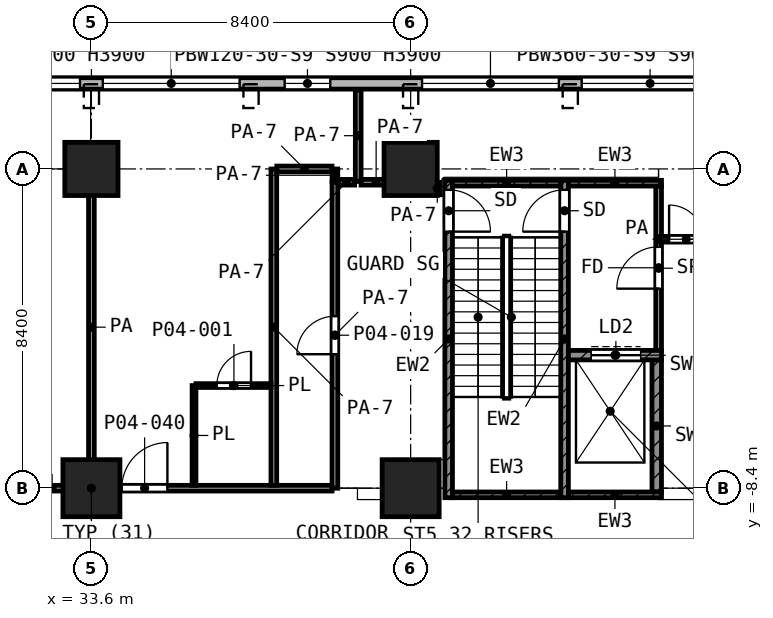
"""IFC4 building model, lengths in metres.
Left out: names, types, materials, properties, quantities, classifications, styles, units other than length and angle.
Written with IfcOpenShell. Run it as: python <this file> out.ifc"""

import sys

from ifc_helpers import new_model, si_unit, direction, frame, frame_2d, origin, origin_2d, place, context, subcontext, project, spatial, rectangle, extrude, element, fill, save


model = new_model("IFC4")
c1 = context("Model", 3, precision=1e-05, world=origin(), true_north=direction((0.0, 1.0)))
c2 = subcontext(c1, "Body", "Model", "MODEL_VIEW")
j1 = project(units=[si_unit("LENGTHUNIT", "METRE"), si_unit("PLANEANGLEUNIT", "RADIAN")], contexts=[c1])
p1 = place(None, origin())
s1 = spatial("IfcSite", under=j1, at=p1, CompositionType="ELEMENT")
p2 = place(p1, origin())
s2 = spatial("IfcBuilding", under=s1, at=p2, CompositionType="ELEMENT")
p3 = place(p2, frame((0.0, 0.0, 18.2)))
s3 = spatial("IfcBuildingStorey", under=s2, at=p3, CompositionType="ELEMENT", Elevation=18.2)
for number, where, z_axis, x_axis in (
    (1, (33.6, 0.0, 0.0), (0.0, 0.0, 1.0), (1.0, 0.0, 0.0)),
    (2, (42.0, 0.0, 0.0), (0.0, 0.0, 1.0), (1.0, 0.0, 0.0)),
):
    element("IfcColumn", number, at=place(p3, frame(where, z_axis=z_axis, x_axis=x_axis)), inside=s3, PredefinedType="COLUMN", context=c2, shape_type="SweptSolid", body=[
        extrude(rectangle(XDim=1.4, YDim=1.4, at=origin_2d()), origin(), (0.0, 0.0, 1.0), 5.6),
    ])
for number, where, z_axis, x_axis in (
    (3, (33.6, -8.4, 0.0), (0.0, 0.0, 1.0), (1.0, 0.0, 0.0)),
    (4, (42.0, -8.4, 0.0), (0.0, 0.0, 1.0), (1.0, 0.0, 0.0)),
):
    element("IfcColumn", number, at=place(p3, frame(where, z_axis=z_axis, x_axis=x_axis)), inside=s3, PredefinedType="COLUMN", context=c2, shape_type="SweptSolid", body=[
        extrude(rectangle(XDim=1.5, YDim=1.5, at=origin_2d()), origin(), (0.0, 0.0, 1.0), 5.6),
    ])
p4 = place(p3, frame((59.85, 2.25, 0.0), z_axis=(0.0, 0.0, 1.0), x_axis=(-1.0, 0.0, 0.0)))
e5 = element("IfcWall", 5, at=p4, inside=s3, PredefinedType="SOLIDWALL", context=c2, shape_type="SweptSolid", body=[
    extrude(rectangle(XDim=56.188, YDim=0.3, at=frame_2d((28.094, 0.0))), origin(), (0.0, 0.0, 1.0), 5.05),
])
p5 = place(p4, frame((2.465, 0.0, 0.9)))
e6 = element("IfcOpeningElement", 6, at=p5, cuts=e5, PredefinedType="OPENING", context=c2, shape_type="SweptSolid", body=[
    extrude(rectangle(XDim=2.4, YDim=3.0, at=frame_2d((1.2, 1.5))), frame((0.0, 0.16, 0.0), z_axis=(0.0, -1.0, 0.0), x_axis=(1.0, 0.0, 0.0)), (0.0, 0.0, 1.0), 0.32),
])
p6 = place(p4, frame((5.55, 0.0, 0.9)))
e7 = element("IfcOpeningElement", 7, at=p6, cuts=e5, PredefinedType="OPENING", context=c2, shape_type="SweptSolid", body=[
    extrude(rectangle(XDim=3.6, YDim=3.0, at=frame_2d((1.8, 1.5))), frame((0.0, 0.16, 0.0), z_axis=(0.0, -1.0, 0.0), x_axis=(1.0, 0.0, 0.0)), (0.0, 0.0, 1.0), 0.32),
])
p7 = place(p4, frame((9.75, 0.0, 0.9)))
e8 = element("IfcOpeningElement", 8, at=p7, cuts=e5, PredefinedType="OPENING", context=c2, shape_type="SweptSolid", body=[
    extrude(rectangle(XDim=3.6, YDim=3.0, at=frame_2d((1.8, 1.5))), frame((0.0, 0.16, 0.0), z_axis=(0.0, -1.0, 0.0), x_axis=(1.0, 0.0, 0.0)), (0.0, 0.0, 1.0), 0.32),
])
p8 = place(p4, frame((13.95, 0.0, 0.9)))
e9 = element("IfcOpeningElement", 9, at=p8, cuts=e5, PredefinedType="OPENING", context=c2, shape_type="SweptSolid", body=[
    extrude(rectangle(XDim=3.6, YDim=3.0, at=frame_2d((1.8, 1.5))), frame((0.0, 0.16, 0.0), z_axis=(0.0, -1.0, 0.0), x_axis=(1.0, 0.0, 0.0)), (0.0, 0.0, 1.0), 0.32),
])
p9 = place(p4, frame((19.965, 0.0, 0.9)))
e10 = element("IfcOpeningElement", 10, at=p9, cuts=e5, PredefinedType="OPENING", context=c2, shape_type="SweptSolid", body=[
    extrude(rectangle(XDim=1.2, YDim=3.0, at=frame_2d((0.6, 1.5))), frame((0.0, 0.16, 0.0), z_axis=(0.0, -1.0, 0.0), x_axis=(1.0, 0.0, 0.0)), (0.0, 0.0, 1.0), 0.32),
])
p10 = place(p4, frame((22.35, 0.0, 0.9)))
e11 = element("IfcOpeningElement", 11, at=p10, cuts=e5, PredefinedType="OPENING", context=c2, shape_type="SweptSolid", body=[
    extrude(rectangle(XDim=3.6, YDim=3.0, at=frame_2d((1.8, 1.5))), frame((0.0, 0.16, 0.0), z_axis=(0.0, -1.0, 0.0), x_axis=(1.0, 0.0, 0.0)), (0.0, 0.0, 1.0), 0.32),
])
p11 = place(p4, frame((26.55, 0.0, 0.9)))
e12 = element("IfcOpeningElement", 12, at=p11, cuts=e5, PredefinedType="OPENING", context=c2, shape_type="SweptSolid", body=[
    extrude(rectangle(XDim=3.6, YDim=3.0, at=frame_2d((1.8, 1.5))), frame((0.0, 0.16, 0.0), z_axis=(0.0, -1.0, 0.0), x_axis=(1.0, 0.0, 0.0)), (0.0, 0.0, 1.0), 0.32),
])
p12 = place(p4, frame((30.75, 0.0, 0.9)))
e13 = element("IfcOpeningElement", 13, at=p12, cuts=e5, PredefinedType="OPENING", context=c2, shape_type="SweptSolid", body=[
    extrude(rectangle(XDim=3.6, YDim=3.0, at=frame_2d((1.8, 1.5))), frame((0.0, 0.16, 0.0), z_axis=(0.0, -1.0, 0.0), x_axis=(1.0, 0.0, 0.0)), (0.0, 0.0, 1.0), 0.32),
])
p13 = place(p4, frame((34.95, 0.0, 0.9)))
e14 = element("IfcOpeningElement", 14, at=p13, cuts=e5, PredefinedType="OPENING", context=c2, shape_type="SweptSolid", body=[
    extrude(rectangle(XDim=3.6, YDim=3.0, at=frame_2d((1.8, 1.5))), frame((0.0, 0.16, 0.0), z_axis=(0.0, -1.0, 0.0), x_axis=(1.0, 0.0, 0.0)), (0.0, 0.0, 1.0), 0.32),
])
p14 = place(p4, frame((39.15, 0.0, 0.9)))
e15 = element("IfcOpeningElement", 15, at=p14, cuts=e5, PredefinedType="OPENING", context=c2, shape_type="SweptSolid", body=[
    extrude(rectangle(XDim=3.6, YDim=3.0, at=frame_2d((1.8, 1.5))), frame((0.0, 0.16, 0.0), z_axis=(0.0, -1.0, 0.0), x_axis=(1.0, 0.0, 0.0)), (0.0, 0.0, 1.0), 0.32),
])
p15 = place(p4, frame((43.35, 0.0, 0.9)))
e16 = element("IfcOpeningElement", 16, at=p15, cuts=e5, PredefinedType="OPENING", context=c2, shape_type="SweptSolid", body=[
    extrude(rectangle(XDim=3.6, YDim=3.0, at=frame_2d((1.8, 1.5))), frame((0.0, 0.16, 0.0), z_axis=(0.0, -1.0, 0.0), x_axis=(1.0, 0.0, 0.0)), (0.0, 0.0, 1.0), 0.32),
])
p16 = place(p4, frame((47.55, 0.0, 0.9)))
e17 = element("IfcOpeningElement", 17, at=p16, cuts=e5, PredefinedType="OPENING", context=c2, shape_type="SweptSolid", body=[
    extrude(rectangle(XDim=3.6, YDim=3.0, at=frame_2d((1.8, 1.5))), frame((0.0, 0.16, 0.0), z_axis=(0.0, -1.0, 0.0), x_axis=(1.0, 0.0, 0.0)), (0.0, 0.0, 1.0), 0.32),
])
p17 = place(p4, frame((51.75, 0.0, 0.9)))
e18 = element("IfcOpeningElement", 18, at=p17, cuts=e5, PredefinedType="OPENING", context=c2, shape_type="SweptSolid", body=[
    extrude(rectangle(XDim=3.6, YDim=3.0, at=frame_2d((1.8, 1.5))), frame((0.0, 0.16, 0.0), z_axis=(0.0, -1.0, 0.0), x_axis=(1.0, 0.0, 0.0)), (0.0, 0.0, 1.0), 0.32),
])
p18 = place(p3, frame((43.0, -8.65, 0.0), z_axis=(0.0, 0.0, 1.0), x_axis=(0.0, 1.0, 0.0)))
e19 = element("IfcWall", 19, at=p18, inside=s3, PredefinedType="SHEAR", context=c2, shape_type="SweptSolid", body=[
    extrude(rectangle(XDim=8.35, YDim=0.2, at=frame_2d((4.175, 0.0))), origin(), (0.0, 0.0, 1.0), 5.05),
])
p19 = place(p18, frame((7.0, 0.0, 0.0)))
e20 = element("IfcOpeningElement", 20, at=p19, cuts=e19, PredefinedType="OPENING", context=c2, shape_type="SweptSolid", body=[
    extrude(rectangle(XDim=1.1, YDim=2.1, at=frame_2d((0.55, 1.05))), frame((0.0, 0.11, 0.0), z_axis=(0.0, -1.0, 0.0), x_axis=(1.0, 0.0, 0.0)), (0.0, 0.0, 1.0), 0.22),
])
p20 = place(p3, frame((46.05, -8.65, 0.0), z_axis=(0.0, 0.0, 1.0), x_axis=(0.0, 1.0, 0.0)))
e21 = element("IfcWall", 21, at=p20, inside=s3, PredefinedType="SHEAR", context=c2, shape_type="SweptSolid", body=[
    extrude(rectangle(XDim=8.35, YDim=0.2, at=frame_2d((4.175, 0.0))), origin(), (0.0, 0.0, 1.0), 5.05),
])
p21 = place(p20, frame((7.0, 0.0, 0.0)))
e22 = element("IfcOpeningElement", 22, at=p21, cuts=e21, PredefinedType="OPENING", context=c2, shape_type="SweptSolid", body=[
    extrude(rectangle(XDim=1.1, YDim=2.1, at=frame_2d((0.55, 1.05))), frame((0.0, 0.11, 0.0), z_axis=(0.0, -1.0, 0.0), x_axis=(1.0, 0.0, 0.0)), (0.0, 0.0, 1.0), 0.22),
])
p22 = place(p3, frame((43.1, -0.375, 0.0), z_axis=(0.0, 0.0, 1.0), x_axis=(1.0, 0.0, 0.0)))
e23 = element("IfcWall", 23, at=p22, inside=s3, PredefinedType="SHEAR", context=c2, shape_type="SweptSolid", body=[
    extrude(rectangle(XDim=2.85, YDim=0.15, at=frame_2d((1.425, 0.0))), origin(), (0.0, 0.0, 1.0), 5.05),
])
p23 = place(p3, frame((46.15, -0.375, 0.0), z_axis=(0.0, 0.0, 1.0), x_axis=(1.0, 0.0, 0.0)))
e24 = element("IfcWall", 24, at=p23, inside=s3, PredefinedType="SHEAR", context=c2, shape_type="SweptSolid", body=[
    extrude(rectangle(XDim=2.45, YDim=0.15, at=frame_2d((1.225, 0.0))), origin(), (0.0, 0.0, 1.0), 5.05),
])
p24 = place(p3, frame((43.1, -8.575, 0.0), z_axis=(0.0, 0.0, 1.0), x_axis=(1.0, 0.0, 0.0)))
e25 = element("IfcWall", 25, at=p24, inside=s3, PredefinedType="SHEAR", context=c2, shape_type="SweptSolid", body=[
    extrude(rectangle(XDim=2.85, YDim=0.15, at=frame_2d((1.425, 0.0))), origin(), (0.0, 0.0, 1.0), 5.05),
])
p25 = place(p3, frame((46.15, -8.575, 0.0), z_axis=(0.0, 0.0, 1.0), x_axis=(1.0, 0.0, 0.0)))
e26 = element("IfcWall", 26, at=p25, inside=s3, PredefinedType="SHEAR", context=c2, shape_type="SweptSolid", body=[
    extrude(rectangle(XDim=2.45, YDim=0.15, at=frame_2d((1.225, 0.0))), origin(), (0.0, 0.0, 1.0), 5.05),
])
p26 = place(p3, frame((46.15, -4.9, 0.0), z_axis=(0.0, 0.0, 1.0), x_axis=(1.0, 0.0, 0.0)))
e27 = element("IfcWall", 27, at=p26, inside=s3, PredefinedType="SHEAR", context=c2, shape_type="SweptSolid", body=[
    extrude(rectangle(XDim=2.45, YDim=0.25, at=frame_2d((1.225, 0.0))), origin(), (0.0, 0.0, 1.0), 5.05),
])
p27 = place(p26, frame((0.6, 0.0, 0.0)))
e28 = element("IfcOpeningElement", 28, at=p27, cuts=e27, PredefinedType="OPENING", context=c2, shape_type="SweptSolid", body=[
    extrude(rectangle(XDim=1.3, YDim=2.1, at=frame_2d((0.65, 1.05))), frame((0.0, 0.135, 0.0), z_axis=(0.0, -1.0, 0.0), x_axis=(1.0, 0.0, 0.0)), (0.0, 0.0, 1.0), 0.27),
])
p28 = place(p3, frame((48.475, -8.5, 0.0), z_axis=(0.0, 0.0, 1.0), x_axis=(0.0, 1.0, 0.0)))
e29 = element("IfcWall", 29, at=p28, inside=s3, PredefinedType="SHEAR", context=c2, shape_type="SweptSolid", body=[
    extrude(rectangle(XDim=3.475, YDim=0.25, at=frame_2d((1.738, 0.0))), origin(), (0.0, 0.0, 1.0), 5.05),
])
p29 = place(p3, frame((48.525, -4.775, 0.0), z_axis=(0.0, 0.0, 1.0), x_axis=(0.0, 1.0, 0.0)))
e30 = element("IfcWall", 30, at=p29, inside=s3, PredefinedType="PARTITIONING", context=c2, shape_type="SweptSolid", body=[
    extrude(rectangle(XDim=4.325, YDim=0.15, at=frame_2d((2.163, 0.0))), origin(), (0.0, 0.0, 1.0), 5.05),
])
p30 = place(p29, frame((1.625, 0.0, 0.0)))
e31 = element("IfcOpeningElement", 31, at=p30, cuts=e30, PredefinedType="OPENING", context=c2, shape_type="SweptSolid", body=[
    extrude(rectangle(XDim=1.1, YDim=2.1, at=frame_2d((0.55, 1.05))), frame((0.0, 0.085, 0.0), z_axis=(0.0, -1.0, 0.0), x_axis=(1.0, 0.0, 0.0)), (0.0, 0.0, 1.0), 0.17),
])
p31 = place(p3, frame((36.35, -5.7, 0.0), z_axis=(0.0, 0.0, 1.0), x_axis=(1.0, 0.0, 0.0)))
e32 = element("IfcWall", 32, at=p31, inside=s3, PredefinedType="PARTITIONING", context=c2, shape_type="SweptSolid", body=[
    extrude(rectangle(XDim=1.975, YDim=0.1, at=frame_2d((0.987, 0.0))), origin(), (0.0, 0.0, 1.0), 5.05),
])
p32 = place(p31, frame((0.55, 0.0, 0.0)))
e33 = element("IfcOpeningElement", 33, at=p32, cuts=e32, PredefinedType="OPENING", context=c2, shape_type="SweptSolid", body=[
    extrude(rectangle(XDim=0.9, YDim=2.1, at=frame_2d((0.45, 1.05))), frame((0.0, 0.06, 0.0), z_axis=(0.0, -1.0, 0.0), x_axis=(1.0, 0.0, 0.0)), (0.0, 0.0, 1.0), 0.12),
])
p33 = place(p3, frame((36.3, -8.325, 0.0), z_axis=(0.0, 0.0, 1.0), x_axis=(0.0, 1.0, 0.0)))
e34 = element("IfcWall", 34, at=p33, inside=s3, PredefinedType="PARTITIONING", context=c2, shape_type="SweptSolid", body=[
    extrude(rectangle(XDim=2.625, YDim=0.1, at=frame_2d((1.312, 0.0))), origin(), (0.0, 0.0, 1.0), 5.05),
])
p34 = place(p3, frame((25.2, -8.4, 0.0), z_axis=(0.0, 0.0, 1.0), x_axis=(1.0, 0.0, 0.0)))
e35 = element("IfcWall", 35, at=p34, inside=s3, PredefinedType="PARTITIONING", context=c2, shape_type="SweptSolid", body=[
    extrude(rectangle(XDim=14.732, YDim=0.15, at=frame_2d((7.366, 0.0))), origin(), (0.0, 0.0, 1.0), 5.05),
])
p35 = place(p34, frame((3.6, 0.0, 0.0)))
e36 = element("IfcOpeningElement", 36, at=p35, cuts=e35, PredefinedType="OPENING", context=c2, shape_type="SweptSolid", body=[
    extrude(rectangle(XDim=1.2, YDim=2.1, at=frame_2d((0.6, 1.05))), frame((0.0, 0.085, 0.0), z_axis=(0.0, -1.0, 0.0), x_axis=(1.0, 0.0, 0.0)), (0.0, 0.0, 1.0), 0.17),
])
p36 = place(p34, frame((9.2, 0.0, 0.0)))
e37 = element("IfcOpeningElement", 37, at=p36, cuts=e35, PredefinedType="OPENING", context=c2, shape_type="SweptSolid", body=[
    extrude(rectangle(XDim=1.2, YDim=2.1, at=frame_2d((0.6, 1.05))), frame((0.0, 0.085, 0.0), z_axis=(0.0, -1.0, 0.0), x_axis=(1.0, 0.0, 0.0)), (0.0, 0.0, 1.0), 0.17),
])
p37 = place(p3, frame((48.55, -1.85, 0.0), z_axis=(0.0, 0.0, 1.0), x_axis=(1.0, 0.0, 0.0)))
e38 = element("IfcWall", 38, at=p37, inside=s3, PredefinedType="PARTITIONING", context=c2, shape_type="SweptSolid", body=[
    extrude(rectangle(XDim=2.298, YDim=0.15, at=frame_2d((1.149, 0.0))), origin(), (0.0, 0.0, 1.0), 5.05),
])
p38 = place(p37, frame((0.25, 0.0, 0.0)))
e39 = element("IfcOpeningElement", 39, at=p38, cuts=e38, PredefinedType="OPENING", context=c2, shape_type="SweptSolid", body=[
    extrude(rectangle(XDim=0.9, YDim=2.1, at=frame_2d((0.45, 1.05))), frame((0.0, 0.085, 0.0), z_axis=(0.0, -1.0, 0.0), x_axis=(1.0, 0.0, 0.0)), (0.0, 0.0, 1.0), 0.17),
])
p39 = place(p3, frame((40.102, -0.35, 0.0), z_axis=(0.0, 0.0, 1.0), x_axis=(1.0, 0.0, 0.0)))
e40 = element("IfcWall", 40, at=p39, inside=s3, PredefinedType="PARTITIONING", context=c2, shape_type="SweptSolid", body=[
    extrude(rectangle(XDim=0.423, YDim=0.15, at=frame_2d((0.211, 0.0))), origin(), (0.0, 0.0, 1.0), 3.65),
])
p40 = place(p3, frame((40.695, -0.35, 0.0), z_axis=(0.0, 0.0, 1.0), x_axis=(1.0, 0.0, 0.0)))
e41 = element("IfcWall", 41, at=p40, inside=s3, PredefinedType="PARTITIONING", context=c2, shape_type="SweptSolid", body=[
    extrude(rectangle(XDim=0.793, YDim=0.15, at=frame_2d((0.396, 0.0))), origin(), (0.0, 0.0, 1.0), 3.65),
])
p41 = place(p3, frame((38.478, 0.0, 0.0), z_axis=(0.0, 0.0, 1.0), x_axis=(1.0, 0.0, 0.0)))
e42 = element("IfcWall", 42, at=p41, inside=s3, PredefinedType="PARTITIONING", context=c2, shape_type="SweptSolid", body=[
    extrude(rectangle(XDim=1.452, YDim=0.15, at=frame_2d((0.726, 0.0))), origin(), (0.0, 0.0, 1.0), 3.65),
])
p42 = place(p3, frame((33.6, -8.325, 0.0), z_axis=(0.0, 0.0, 1.0), x_axis=(0.0, 1.0, 0.0)))
e43 = element("IfcWall", 43, at=p42, inside=s3, PredefinedType="PARTITIONING", context=c2, shape_type="SweptSolid", body=[
    extrude(rectangle(XDim=8.323, YDim=0.15, at=frame_2d((4.162, 0.0))), origin(), (0.0, 0.0, 1.0), 5.05),
])
p43 = place(p3, frame((38.4, -8.325, 0.0), z_axis=(0.0, 0.0, 1.0), x_axis=(0.0, 1.0, 0.0)))
e44 = element("IfcWall", 44, at=p43, inside=s3, PredefinedType="PARTITIONING", context=c2, shape_type="SweptSolid", body=[
    extrude(rectangle(XDim=8.323, YDim=0.15, at=frame_2d((4.162, 0.0))), origin(), (0.0, 0.0, 1.0), 3.65),
])
p44 = place(p3, frame((40.007, -8.4, 0.0), z_axis=(0.0, 0.0, 1.0), x_axis=(0.0, 1.0, 0.0)))
e45 = element("IfcWall", 45, at=p44, inside=s3, PredefinedType="PARTITIONING", context=c2, shape_type="SweptSolid", body=[
    extrude(rectangle(XDim=8.05, YDim=0.15, at=frame_2d((4.025, 0.0))), origin(), (0.0, 0.0, 1.0), 3.65),
])
p45 = place(p44, frame((3.525, 0.0, 0.0)))
e46 = element("IfcOpeningElement", 46, at=p45, cuts=e45, PredefinedType="OPENING", context=c2, shape_type="SweptSolid", body=[
    extrude(rectangle(XDim=1.0, YDim=2.1, at=frame_2d((0.5, 1.05))), frame((0.0, 0.085, 0.0), z_axis=(0.0, -1.0, 0.0), x_axis=(1.0, 0.0, 0.0)), (0.0, 0.0, 1.0), 0.17),
])
p46 = place(p3, frame((40.007, -0.33, 0.0), z_axis=(0.0, 0.0, 1.0), x_axis=(0.0, 1.0, 0.0)))
e47 = element("IfcWall", 47, at=p46, inside=s3, PredefinedType="PARTITIONING", context=c2, shape_type="SweptSolid", body=[
    extrude(rectangle(XDim=0.328, YDim=0.15, at=frame_2d((0.164, 0.0))), origin(), (0.0, 0.0, 1.0), 3.65),
])
p47 = place(p3, frame((40.62, -0.33, 0.0), z_axis=(0.0, 0.0, 1.0), x_axis=(0.0, 1.0, 0.0)))
e48 = element("IfcWall", 48, at=p47, inside=s3, PredefinedType="PARTITIONING", context=c2, shape_type="SweptSolid", body=[
    extrude(rectangle(XDim=2.41, YDim=0.15, at=frame_2d((1.205, 0.0))), origin(), (0.0, 0.0, 1.0), 3.65),
])
p48 = place(p3, frame((42.7, -0.68, 0.0), z_axis=(0.0, 0.0, 1.0), x_axis=(0.0, 1.0, 0.0)))
e49 = element("IfcWall", 49, at=p48, inside=s3, PredefinedType="PARTITIONING", context=c2, shape_type="SweptSolid", body=[
    extrude(rectangle(XDim=0.327, YDim=0.15, at=frame_2d((0.164, 0.0))), origin(), (0.0, 0.0, 1.0), 3.65),
])
p49 = place(p7, origin())
e50 = element("IfcWindow", 50, at=p49, inside=s3, PartitioningType="SINGLE_PANEL", PredefinedType="WINDOW", context=c2, shape_type="SweptSolid", body=[
    extrude(rectangle(XDim=3.6, YDim=3.0, at=frame_2d((1.8, 1.5))), frame((0.0, 0.03, 0.0), z_axis=(0.0, -1.0, 0.0), x_axis=(1.0, 0.0, 0.0)), (0.0, 0.0, 1.0), 0.06),
])
fill(e8, e50)
p50 = place(p8, origin())
e51 = element("IfcWindow", 51, at=p50, inside=s3, PartitioningType="SINGLE_PANEL", PredefinedType="WINDOW", context=c2, shape_type="SweptSolid", body=[
    extrude(rectangle(XDim=3.6, YDim=3.0, at=frame_2d((1.8, 1.5))), frame((0.0, 0.03, 0.0), z_axis=(0.0, -1.0, 0.0), x_axis=(1.0, 0.0, 0.0)), (0.0, 0.0, 1.0), 0.06),
])
fill(e9, e51)
p51 = place(p9, origin())
e52 = element("IfcWindow", 52, at=p51, inside=s3, PartitioningType="SINGLE_PANEL", PredefinedType="WINDOW", context=c2, shape_type="SweptSolid", body=[
    extrude(rectangle(XDim=1.2, YDim=3.0, at=frame_2d((0.6, 1.5))), frame((0.0, 0.03, 0.0), z_axis=(0.0, -1.0, 0.0), x_axis=(1.0, 0.0, 0.0)), (0.0, 0.0, 1.0), 0.06),
])
fill(e10, e52)
p52 = place(p10, origin())
e53 = element("IfcWindow", 53, at=p52, inside=s3, PartitioningType="SINGLE_PANEL", PredefinedType="WINDOW", context=c2, shape_type="SweptSolid", body=[
    extrude(rectangle(XDim=3.6, YDim=3.0, at=frame_2d((1.8, 1.5))), frame((0.0, 0.03, 0.0), z_axis=(0.0, -1.0, 0.0), x_axis=(1.0, 0.0, 0.0)), (0.0, 0.0, 1.0), 0.06),
])
fill(e11, e53)
p53 = place(p11, origin())
e54 = element("IfcWindow", 54, at=p53, inside=s3, PartitioningType="SINGLE_PANEL", PredefinedType="WINDOW", context=c2, shape_type="SweptSolid", body=[
    extrude(rectangle(XDim=3.6, YDim=3.0, at=frame_2d((1.8, 1.5))), frame((0.0, 0.03, 0.0), z_axis=(0.0, -1.0, 0.0), x_axis=(1.0, 0.0, 0.0)), (0.0, 0.0, 1.0), 0.06),
])
fill(e12, e54)
p54 = place(p19, frame((1.1, 0.0, 0.0), z_axis=(0.0, 0.0, 1.0), x_axis=(-1.0, 0.0, 0.0)))
e55 = element("IfcDoor", 55, at=p54, inside=s3, OperationType="SINGLE_SWING_LEFT", PredefinedType="DOOR", context=c2, shape_type="SweptSolid", body=[
    extrude(rectangle(XDim=1.1, YDim=2.1, at=frame_2d((0.55, 1.05))), frame((0.0, 0.025, 0.0), z_axis=(0.0, -1.0, 0.0), x_axis=(1.0, 0.0, 0.0)), (0.0, 0.0, 1.0), 0.05),
])
fill(e20, e55)
p55 = place(p21, origin())
e56 = element("IfcDoor", 56, at=p55, inside=s3, OperationType="SINGLE_SWING_LEFT", PredefinedType="DOOR", context=c2, shape_type="SweptSolid", body=[
    extrude(rectangle(XDim=1.1, YDim=2.1, at=frame_2d((0.55, 1.05))), frame((0.0, 0.025, 0.0), z_axis=(0.0, -1.0, 0.0), x_axis=(1.0, 0.0, 0.0)), (0.0, 0.0, 1.0), 0.05),
])
fill(e22, e56)
p56 = place(p27, origin())
e57 = element("IfcDoor", 57, at=p56, inside=s3, OperationType="DOUBLE_DOOR_SLIDING", PredefinedType="DOOR", context=c2, shape_type="SweptSolid", body=[
    extrude(rectangle(XDim=1.3, YDim=2.1, at=frame_2d((0.65, 1.05))), frame((0.0, 0.025, 0.0), z_axis=(0.0, -1.0, 0.0), x_axis=(1.0, 0.0, 0.0)), (0.0, 0.0, 1.0), 0.05),
])
fill(e28, e57)
p57 = place(p30, origin())
e58 = element("IfcDoor", 58, at=p57, inside=s3, OperationType="SINGLE_SWING_LEFT", PredefinedType="DOOR", context=c2, shape_type="SweptSolid", body=[
    extrude(rectangle(XDim=1.1, YDim=2.1, at=frame_2d((0.55, 1.05))), frame((0.0, 0.025, 0.0), z_axis=(0.0, -1.0, 0.0), x_axis=(1.0, 0.0, 0.0)), (0.0, 0.0, 1.0), 0.05),
])
fill(e31, e58)
p58 = place(p36, origin())
e59 = element("IfcDoor", 59, at=p58, inside=s3, OperationType="SINGLE_SWING_RIGHT", PredefinedType="DOOR", context=c2, shape_type="SweptSolid", body=[
    extrude(rectangle(XDim=1.2, YDim=2.1, at=frame_2d((0.6, 1.05))), frame((0.0, 0.025, 0.0), z_axis=(0.0, -1.0, 0.0), x_axis=(1.0, 0.0, 0.0)), (0.0, 0.0, 1.0), 0.05),
])
fill(e37, e59)
p59 = place(p32, origin())
e60 = element("IfcDoor", 60, at=p59, inside=s3, OperationType="SINGLE_SWING_RIGHT", PredefinedType="DOOR", context=c2, shape_type="SweptSolid", body=[
    extrude(rectangle(XDim=0.9, YDim=2.1, at=frame_2d((0.45, 1.05))), frame((0.0, 0.025, 0.0), z_axis=(0.0, -1.0, 0.0), x_axis=(1.0, 0.0, 0.0)), (0.0, 0.0, 1.0), 0.05),
])
fill(e33, e60)
p60 = place(p38, origin())
e61 = element("IfcDoor", 61, at=p60, inside=s3, OperationType="SINGLE_SWING_LEFT", PredefinedType="DOOR", context=c2, shape_type="SweptSolid", body=[
    extrude(rectangle(XDim=0.9, YDim=2.1, at=frame_2d((0.45, 1.05))), frame((0.0, 0.025, 0.0), z_axis=(0.0, -1.0, 0.0), x_axis=(1.0, 0.0, 0.0)), (0.0, 0.0, 1.0), 0.05),
])
fill(e39, e61)
p61 = place(p45, origin())
e62 = element("IfcDoor", 62, at=p61, inside=s3, OperationType="SINGLE_SWING_LEFT", PredefinedType="DOOR", context=c2, shape_type="SweptSolid", body=[
    extrude(rectangle(XDim=1.0, YDim=2.1, at=frame_2d((0.5, 1.05))), frame((0.0, 0.025, 0.0), z_axis=(0.0, -1.0, 0.0), x_axis=(1.0, 0.0, 0.0)), (0.0, 0.0, 1.0), 0.05),
])
fill(e46, e62)
save(model, sys.argv[1])
